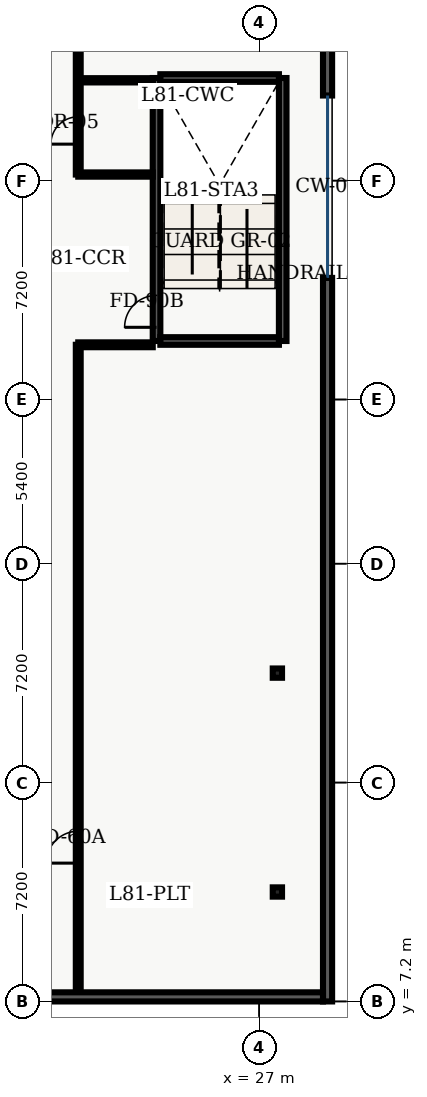
"""IFC4 building model, lengths in metres.
Left out: names, types, materials, properties, quantities, classifications, styles, units other than length and angle.
Written with IfcOpenShell. Run it as: python <this file> out.ifc"""

import sys

from ifc_helpers import new_model, entity, si_unit, converted_unit, direction, frame, origin_with_axes, origin_2d_with_axis, place, context, subcontext, project, spatial, polyline, rectangle, hollow_rectangle, outline, extrude, element, fill, save


model = new_model("IFC4")
c1 = context("Model", 3, precision=1e-05, world=origin_with_axes(), true_north=direction((0.0, 1.0)))
c2 = subcontext(c1, "Body", "Model", "MODEL_VIEW")
j1 = project(units=[si_unit("LENGTHUNIT", "METRE"), converted_unit("PLANEANGLEUNIT", "DEGREE", entity("IfcPlaneAngleMeasure", 0.017), si_unit("PLANEANGLEUNIT", "RADIAN"), dimensions=[0, 0, 0, 0, 0, 0, 0])], contexts=[c1])
p1 = place(None, origin_with_axes())
s1 = spatial("IfcSite", under=j1, at=p1, CompositionType="ELEMENT")
p2 = place(p1, origin_with_axes())
s2 = spatial("IfcBuilding", under=s1, at=p2, CompositionType="ELEMENT")
p3 = place(p2, frame((0.0, 0.0, 328.2), z_axis=(0.0, 0.0, 1.0), x_axis=(1.0, 0.0, 0.0)))
s3 = spatial("IfcBuildingStorey", under=s2, at=p3, CompositionType="ELEMENT", Elevation=328.2)
p4 = place(p3, frame((23.625, 28.925, 0.0), z_axis=(0.0, 0.0, 1.0), x_axis=(0.0, 1.0, 0.0)))
e1 = element("IfcWall", 1, at=p4, inside=s3, PredefinedType="SHEAR", context=c2, shape_type="SweptSolid", body=[
    extrude(outline(polyline([(0.0, -0.125), (8.65, -0.125), (8.65, 0.125), (0.0, 0.125), (0.0, -0.125)])), origin_with_axes(), (0.0, 0.0, 1.0), 3.64),
])
p5 = place(p4, frame((0.975, 0.0, 0.0), z_axis=(0.0, 0.0, 1.0), x_axis=(1.0, 0.0, 0.0)))
e2 = element("IfcOpeningElement", 2, at=p5, cuts=e1, PredefinedType="OPENING", context=c2, shape_type="SweptSolid", body=[
    extrude(rectangle(XDim=1.05, YDim=0.27, at=origin_2d_with_axis()), origin_with_axes(), (0.0, 0.0, 1.0), 2.15),
])
p6 = place(p3, frame((27.775, 28.925, 0.0), z_axis=(0.0, 0.0, 1.0), x_axis=(0.0, 1.0, 0.0)))
e3 = element("IfcWall", 3, at=p6, inside=s3, PredefinedType="SHEAR", context=c2, shape_type="SweptSolid", body=[
    extrude(outline(polyline([(0.0, -0.125), (8.65, -0.125), (8.65, 0.125), (0.0, 0.125), (0.0, -0.125)])), origin_with_axes(), (0.0, 0.0, 1.0), 3.64),
])
for number, where, z_axis, x_axis in (
    (4, (23.75, 28.925, 0.0), (0.0, 0.0, 1.0), (1.0, 0.0, 0.0)),
    (5, (23.75, 37.575, 0.0), (0.0, 0.0, 1.0), (1.0, 0.0, 0.0)),
):
    element("IfcWall", number, at=place(p3, frame(where, z_axis=z_axis, x_axis=x_axis)), inside=s3, PredefinedType="SHEAR", context=c2, shape_type="SweptSolid", body=[
        extrude(outline(polyline([(0.0, -0.125), (3.9, -0.125), (3.9, 0.125), (0.0, 0.125), (0.0, -0.125)])), origin_with_axes(), (0.0, 0.0, 1.0), 3.64),
    ])
for number, where, z_axis, x_axis in (
    (6, (27.6, 10.8, 0.0), (0.0, 0.0, 1.0), (1.0, 0.0, 0.0)),
    (7, (27.6, 18.0, 0.0), (0.0, 0.0, 1.0), (1.0, 0.0, 0.0)),
):
    element("IfcColumn", number, at=place(p3, frame(where, z_axis=z_axis, x_axis=x_axis)), inside=s3, PredefinedType="COLUMN", context=c2, shape_type="SweptSolid", body=[
        extrude(hollow_rectangle(XDim=0.305, YDim=0.305, WallThickness=0.015, InnerFilletRadius=0.015, OuterFilletRadius=0.03, at=origin_2d_with_axis()), origin_with_axes(), (0.0, 0.0, 1.0), 3.9),
    ])
for number, where, z_axis, x_axis in (
    (8, (21.05, 34.4, 0.0), (0.0, 0.0, 1.0), (1.0, 0.0, 0.0)),
    (9, (21.05, 37.5, 0.0), (0.0, 0.0, 1.0), (1.0, 0.0, 0.0)),
):
    element("IfcWall", number, at=place(p3, frame(where, z_axis=z_axis, x_axis=x_axis)), inside=s3, PredefinedType="PARTITIONING", context=c2, shape_type="SweptSolid", body=[
        extrude(outline(polyline([(0.0, -0.07), (2.45, -0.07), (2.45, 0.07), (0.0, 0.07), (0.0, -0.07)])), origin_with_axes(), (0.0, 0.0, 1.0), 2.68),
    ])
p7 = place(p3, frame((21.05, 7.495, 0.0), z_axis=(0.0, 0.0, 1.0), x_axis=(0.0, 1.0, 0.0)))
e10 = element("IfcWall", 10, at=p7, inside=s3, PredefinedType="PARTITIONING", context=c2, shape_type="SweptSolid", body=[
    extrude(outline(polyline([(0.0, -0.08), (21.305, -0.08), (21.305, 0.08), (0.0, 0.08), (0.0, -0.08)])), origin_with_axes(), (0.0, 0.0, 1.0), 2.68),
])
p8 = place(p7, frame((4.78, 0.0, 0.0), z_axis=(0.0, 0.0, 1.0), x_axis=(1.0, 0.0, 0.0)))
e11 = element("IfcOpeningElement", 11, at=p8, cuts=e10, PredefinedType="OPENING", context=c2, shape_type="SweptSolid", body=[
    extrude(rectangle(XDim=1.05, YDim=0.18, at=origin_2d_with_axis()), origin_with_axes(), (0.0, 0.0, 1.0), 2.15),
])
p9 = place(p3, frame((21.05, 34.4, 0.0), z_axis=(0.0, 0.0, 1.0), x_axis=(0.0, 1.0, 0.0)))
e12 = element("IfcWall", 12, at=p9, inside=s3, PredefinedType="PARTITIONING", context=c2, shape_type="SweptSolid", body=[
    extrude(outline(polyline([(0.0, -0.08), (6.705, -0.08), (6.705, 0.08), (0.0, 0.08), (0.0, -0.08)])), origin_with_axes(), (0.0, 0.0, 1.0), 2.68),
])
p10 = place(p9, frame((1.45, 0.0, 0.0), z_axis=(0.0, 0.0, 1.0), x_axis=(1.0, 0.0, 0.0)))
e13 = element("IfcOpeningElement", 13, at=p10, cuts=e12, PredefinedType="OPENING", context=c2, shape_type="SweptSolid", body=[
    extrude(rectangle(XDim=0.9, YDim=0.18, at=origin_2d_with_axis()), origin_with_axes(), (0.0, 0.0, 1.0), 2.15),
])
p11 = place(p3, frame((21.05, 28.8, 0.0), z_axis=(0.0, 0.0, 1.0), x_axis=(1.0, 0.0, 0.0)))
e14 = element("IfcWall", 14, at=p11, inside=s3, PredefinedType="PARTITIONING", context=c2, shape_type="SweptSolid", body=[
    extrude(outline(polyline([(0.0, -0.08), (2.45, -0.08), (2.45, 0.08), (0.0, 0.08), (0.0, -0.08)])), origin_with_axes(), (0.0, 0.0, 1.0), 2.68),
])
p12 = place(p3, frame((29.25, 41.1, 0.0), z_axis=(0.0, 0.0, 1.0), x_axis=(0.0, -1.0, 0.0)))
e15 = element("IfcWall", 15, at=p12, inside=s3, PredefinedType="SOLIDWALL", context=c2, shape_type="SweptSolid", body=[
    extrude(outline(polyline([(0.0, -0.15), (4.1, -0.15), (4.1, 0.15), (0.0, 0.15), (0.0, -0.15)])), origin_with_axes(), (0.0, 0.0, 1.0), 3.64),
])
p13 = place(p3, frame((29.25, 31.0, 0.0), z_axis=(0.0, 0.0, 1.0), x_axis=(0.0, -1.0, 0.0)))
e16 = element("IfcWall", 16, at=p13, inside=s3, PredefinedType="SOLIDWALL", context=c2, shape_type="SweptSolid", body=[
    extrude(outline(polyline([(0.0, -0.15), (23.8, -0.15), (23.8, 0.15), (0.0, 0.15), (0.0, -0.15)])), origin_with_axes(), (0.0, 0.0, 1.0), 3.64),
])
p14 = place(p3, frame((29.1, 7.35, 0.0), z_axis=(0.0, 0.0, 1.0), x_axis=(-1.0, 0.0, 0.0)))
e17 = element("IfcWall", 17, at=p14, inside=s3, PredefinedType="SOLIDWALL", context=c2, shape_type="SweptSolid", body=[
    extrude(outline(polyline([(0.0, -0.15), (18.5, -0.15), (18.5, 0.15), (0.0, 0.15), (0.0, -0.15)])), origin_with_axes(), (0.0, 0.0, 1.0), 3.64),
])
p15 = place(p4, frame((0.975, 0.0, 0.0), z_axis=(0.0, 0.0, 1.0), x_axis=(1.0, 0.0, 0.0)))
e18 = element("IfcDoor", 18, at=p15, inside=s3, OperationType="SINGLE_SWING_LEFT", PredefinedType="DOOR", context=c2, shape_type="SweptSolid", body=[
    extrude(rectangle(XDim=1.05, YDim=0.09, at=origin_2d_with_axis()), origin_with_axes(), (0.0, 0.0, 1.0), 2.15),
])
fill(e2, e18)
p16 = place(p9, frame((1.45, 0.0, 0.0), z_axis=(0.0, 0.0, 1.0), x_axis=(1.0, 0.0, 0.0)))
e19 = element("IfcDoor", 19, at=p16, inside=s3, OperationType="SINGLE_SWING_LEFT", PredefinedType="DOOR", context=c2, shape_type="SweptSolid", body=[
    extrude(rectangle(XDim=0.9, YDim=0.09, at=origin_2d_with_axis()), origin_with_axes(), (0.0, 0.0, 1.0), 2.15),
])
fill(e13, e19)
p17 = place(p7, frame((4.78, 0.0, 0.0), z_axis=(0.0, 0.0, 1.0), x_axis=(1.0, 0.0, 0.0)))
e20 = element("IfcDoor", 20, at=p17, inside=s3, OperationType="SINGLE_SWING_LEFT", PredefinedType="DOOR", context=c2, shape_type="SweptSolid", body=[
    extrude(rectangle(XDim=1.05, YDim=0.09, at=origin_2d_with_axis()), origin_with_axes(), (0.0, 0.0, 1.0), 2.15),
])
fill(e11, e20)
save(model, sys.argv[1])
